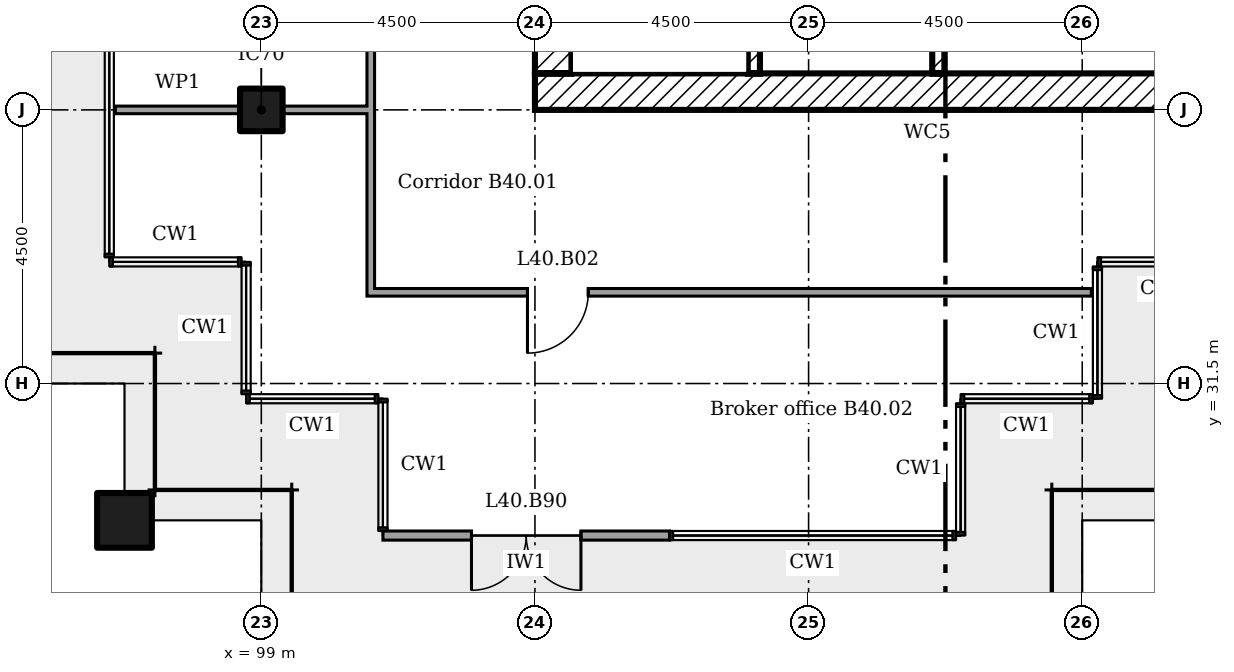
"""IFC4 building model, lengths in metres.
Left out: names, types, materials, properties, quantities, classifications, styles, units other than length and angle.
Written with IfcOpenShell. Run it as: python <this file> out.ifc"""

import sys

from ifc_helpers import new_model, si_unit, direction, frame, frame_2d, origin, origin_2d, place, context, subcontext, project, spatial, rectangle, extrude, element, fill, save


model = new_model("IFC4")
c1 = context("Model", 3, precision=1e-05, world=origin(), true_north=direction((0.0, 1.0)))
c2 = subcontext(c1, "Body", "Model", "MODEL_VIEW")
j1 = project(units=[si_unit("LENGTHUNIT", "METRE"), si_unit("PLANEANGLEUNIT", "RADIAN")], contexts=[c1])
p1 = place(None, origin())
s1 = spatial("IfcSite", under=j1, at=p1, CompositionType="ELEMENT")
p2 = place(p1, origin())
s2 = spatial("IfcBuilding", under=s1, at=p2, CompositionType="ELEMENT")
p3 = place(p2, frame((0.0, 0.0, 161.8)))
s3 = spatial("IfcBuildingStorey", under=s2, at=p3, CompositionType="ELEMENT", Elevation=161.8)
p4 = place(p3, frame((96.75, 29.25, 0.0)))
e1 = element("IfcColumn", 1, at=p4, inside=s3, PredefinedType="COLUMN", context=c2, shape_type="SweptSolid", body=[
    extrude(rectangle(XDim=0.9, YDim=0.9, at=origin_2d()), origin(), (0.0, 0.0, 1.0), 3.6),
])
p5 = place(p3, frame((99.0, 36.0, 0.0)))
e2 = element("IfcColumn", 2, at=p5, inside=s3, PredefinedType="COLUMN", context=c2, shape_type="SweptSolid", body=[
    extrude(rectangle(XDim=0.7, YDim=0.7, at=origin_2d()), origin(), (0.0, 0.0, 1.0), 3.6),
])
p6 = place(p3, frame((101.0, 29.0, 0.0)))
e3 = element("IfcWall", 3, at=p6, inside=s3, PredefinedType="SOLIDWALL", context=c2, shape_type="SweptSolid", body=[
    extrude(rectangle(XDim=4.712, YDim=0.15, at=frame_2d((2.356, 0.0))), origin(), (0.0, 0.0, 1.0), 3.45),
])
p7 = place(p6, frame((1.456, 0.0, 0.0)))
e4 = element("IfcOpeningElement", 4, at=p7, cuts=e3, PredefinedType="OPENING", context=c2, shape_type="SweptSolid", body=[
    extrude(rectangle(XDim=1.8, YDim=2.4, at=frame_2d((0.9, 1.2))), frame((0.0, 0.085, 0.0), z_axis=(0.0, -1.0, 0.0), x_axis=(1.0, 0.0, 0.0)), (0.0, 0.0, 1.0), 0.17),
])
p8 = place(p3, frame((103.5, 36.3, 0.0)))
e5 = element("IfcWall", 5, at=p8, inside=s3, PredefinedType="SHEAR", context=c2, shape_type="SweptSolid", body=[
    extrude(rectangle(XDim=12.9, YDim=0.6, at=frame_2d((6.45, 0.0))), origin(), (0.0, 0.0, 1.0), 3.35),
])
p9 = place(p3, frame((103.8, 36.6, 0.0), z_axis=(0.0, 0.0, 1.0), x_axis=(0.0, 1.0, 0.0)))
e6 = element("IfcWall", 6, at=p9, inside=s3, PredefinedType="SHEAR", context=c2, shape_type="SweptSolid", body=[
    extrude(rectangle(XDim=12.3, YDim=0.6, at=frame_2d((6.15, 0.0))), origin(), (0.0, 0.0, 1.0), 3.35),
])
p10 = place(p9, frame((7.6, 0.0, 0.0)))
e7 = element("IfcOpeningElement", 7, at=p10, cuts=e6, PredefinedType="OPENING", context=c2, shape_type="SweptSolid", body=[
    extrude(rectangle(XDim=1.2, YDim=2.1, at=frame_2d((0.6, 1.05))), frame((0.0, 0.31, 0.0), z_axis=(0.0, -1.0, 0.0), x_axis=(1.0, 0.0, 0.0)), (0.0, 0.0, 1.0), 0.62),
])
p11 = place(p9, frame((5.625, 0.0, 0.0)))
e8 = element("IfcOpeningElement", 8, at=p11, cuts=e6, PredefinedType="OPENING", context=c2, shape_type="SweptSolid", body=[
    extrude(rectangle(XDim=1.0, YDim=2.1, at=frame_2d((0.5, 1.05))), frame((0.0, 0.31, 0.0), z_axis=(0.0, -1.0, 0.0), x_axis=(1.0, 0.0, 0.0)), (0.0, 0.0, 1.0), 0.62),
])
p12 = place(p3, frame((110.133, 36.6, 0.0), z_axis=(0.0, 0.0, 1.0), x_axis=(0.0, 1.0, 0.0)))
e9 = element("IfcWall", 9, at=p12, inside=s3, PredefinedType="SHEAR", context=c2, shape_type="SweptSolid", body=[
    extrude(rectangle(XDim=2.7, YDim=0.2, at=frame_2d((1.35, 0.0))), origin(), (0.0, 0.0, 1.0), 3.35),
])
p13 = place(p3, frame((107.1, 36.6, 0.0), z_axis=(0.0, 0.0, 1.0), x_axis=(0.0, 1.0, 0.0)))
e10 = element("IfcWall", 10, at=p13, inside=s3, PredefinedType="SHEAR", context=c2, shape_type="SweptSolid", body=[
    extrude(rectangle(XDim=7.1, YDim=0.2, at=frame_2d((3.55, 0.0))), origin(), (0.0, 0.0, 1.0), 3.35),
])
p14 = place(p3, frame((100.738, 33.0, 0.0)))
e11 = element("IfcWall", 11, at=p14, inside=s3, PredefinedType="PARTITIONING", context=c2, shape_type="SweptSolid", body=[
    extrude(rectangle(XDim=11.912, YDim=0.125, at=frame_2d((5.956, 0.0))), origin(), (0.0, 0.0, 1.0), 3.45),
])
p15 = place(p14, frame((2.639, 0.0, 0.0)))
e12 = element("IfcOpeningElement", 12, at=p15, cuts=e11, PredefinedType="OPENING", context=c2, shape_type="SweptSolid", body=[
    extrude(rectangle(XDim=1.0, YDim=2.1, at=frame_2d((0.5, 1.05))), frame((0.0, 0.073, 0.0), z_axis=(0.0, -1.0, 0.0), x_axis=(1.0, 0.0, 0.0)), (0.0, 0.0, 1.0), 0.145),
])
p16 = place(p3, frame((96.6, 36.0, 0.0)))
e13 = element("IfcWall", 13, at=p16, inside=s3, PredefinedType="PARTITIONING", context=c2, shape_type="SweptSolid", body=[
    extrude(rectangle(XDim=2.05, YDim=0.125, at=frame_2d((1.025, 0.0))), origin(), (0.0, 0.0, 1.0), 2.842),
])
p17 = place(p3, frame((99.35, 36.0, 0.0)))
e14 = element("IfcWall", 14, at=p17, inside=s3, PredefinedType="PARTITIONING", context=c2, shape_type="SweptSolid", body=[
    extrude(rectangle(XDim=1.45, YDim=0.125, at=frame_2d((0.725, 0.0))), origin(), (0.0, 0.0, 1.0), 2.842),
])
p18 = place(p3, frame((100.8, 33.062, 0.0), z_axis=(0.0, 0.0, 1.0), x_axis=(0.0, 1.0, 0.0)))
e15 = element("IfcWall", 15, at=p18, inside=s3, PredefinedType="PARTITIONING", context=c2, shape_type="SweptSolid", body=[
    extrude(rectangle(XDim=14.375, YDim=0.125, at=frame_2d((7.188, 0.0))), origin(), (0.0, 0.0, 1.0), 3.45),
])
p19 = place(p18, frame((6.938, 0.0, 0.0)))
e16 = element("IfcOpeningElement", 16, at=p19, cuts=e15, PredefinedType="OPENING", context=c2, shape_type="SweptSolid", body=[
    extrude(rectangle(XDim=1.0, YDim=2.1, at=frame_2d((0.5, 1.05))), frame((0.0, 0.073, 0.0), z_axis=(0.0, -1.0, 0.0), x_axis=(1.0, 0.0, 0.0)), (0.0, 0.0, 1.0), 0.145),
])
p20 = place(p18, frame((12.792, 0.0, 0.0)))
e17 = element("IfcOpeningElement", 17, at=p20, cuts=e15, PredefinedType="OPENING", context=c2, shape_type="SweptSolid", body=[
    extrude(rectangle(XDim=1.0, YDim=2.1, at=frame_2d((0.5, 1.05))), frame((0.0, 0.073, 0.0), z_axis=(0.0, -1.0, 0.0), x_axis=(1.0, 0.0, 0.0)), (0.0, 0.0, 1.0), 0.145),
])
p21 = place(p7, frame((1.8, 0.0, 0.0), x_axis=(-1.0, 0.0, 0.0)))
e18 = element("IfcDoor", 18, at=p21, inside=s3, OperationType="DOUBLE_DOOR_DOUBLE_SWING", PredefinedType="NOTDEFINED", context=c2, shape_type="SweptSolid", body=[
    extrude(rectangle(XDim=1.8, YDim=2.4, at=frame_2d((0.9, 1.2))), frame((0.0, 0.025, 0.0), z_axis=(0.0, -1.0, 0.0), x_axis=(1.0, 0.0, 0.0)), (0.0, 0.0, 1.0), 0.05),
])
fill(e4, e18)
p22 = place(p15, frame((1.0, 0.0, 0.0), x_axis=(-1.0, 0.0, 0.0)))
e19 = element("IfcDoor", 19, at=p22, inside=s3, OperationType="SINGLE_SWING_LEFT", PredefinedType="DOOR", context=c2, shape_type="SweptSolid", body=[
    extrude(rectangle(XDim=1.0, YDim=2.1, at=frame_2d((0.5, 1.05))), frame((0.0, 0.025, 0.0), z_axis=(0.0, -1.0, 0.0), x_axis=(1.0, 0.0, 0.0)), (0.0, 0.0, 1.0), 0.05),
])
fill(e12, e19)
save(model, sys.argv[1])
